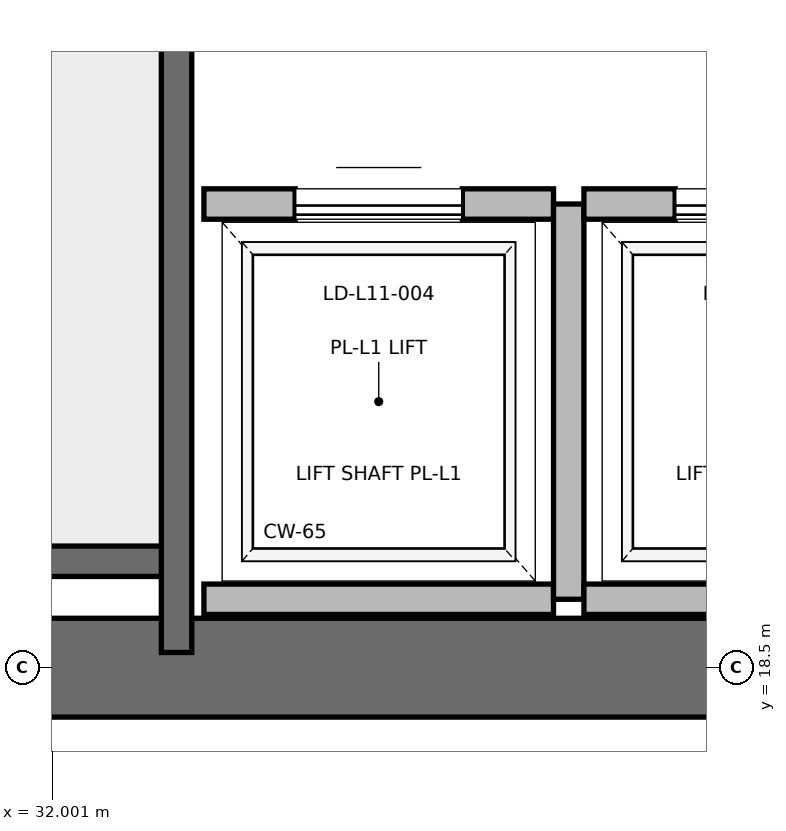
"""IFC4 building model, lengths in metres.
Left out: names, types, materials, properties, quantities, classifications, styles, units other than length and angle.
Written with IfcOpenShell. Run it as: python <this file> out.ifc"""

import sys

from ifc_helpers import new_model, si_unit, direction, frame, frame_2d, origin, place, context, subcontext, project, spatial, rectangle, extrude, element, fill, save


model = new_model("IFC4")
c1 = context("Model", 3, precision=1e-05, world=origin(), true_north=direction((0.0, 1.0)))
c2 = subcontext(c1, "Body", "Model", "MODEL_VIEW")
j1 = project(units=[si_unit("LENGTHUNIT", "METRE"), si_unit("PLANEANGLEUNIT", "RADIAN")], contexts=[c1])
p1 = place(None, origin())
s1 = spatial("IfcSite", under=j1, at=p1, CompositionType="ELEMENT")
p2 = place(p1, origin())
s2 = spatial("IfcBuilding", under=s1, at=p2, CompositionType="ELEMENT")
p3 = place(p2, frame((0.0, 0.0, 51.6)))
s3 = spatial("IfcBuildingStorey", under=s2, at=p3, CompositionType="ELEMENT", Elevation=51.6)
p4 = place(p3, frame((29.0, 18.5, 0.0), z_axis=(0.0, 0.0, 1.0), x_axis=(1.0, 0.0, 0.0)))
e1 = element("IfcWall", 1, at=p4, inside=s3, PredefinedType="SHEAR", context=c2, shape_type="SweptSolid", body=[
    extrude(rectangle(XDim=9.2, YDim=0.65, at=frame_2d((4.6, 0.0))), origin(), (0.0, 0.0, 1.0), 3.76),
])
p5 = place(p3, frame((29.7, 19.2, 0.0), z_axis=(0.0, 0.0, 1.0), x_axis=(1.0, 0.0, 0.0)))
e2 = element("IfcWall", 2, at=p5, inside=s3, PredefinedType="SOLIDWALL", context=c2, shape_type="SweptSolid", body=[
    extrude(rectangle(XDim=3.12, YDim=0.2, at=frame_2d((1.56, 0.0))), origin(), (0.0, 0.0, 1.0), 3.76),
])
p6 = place(p3, frame((32.82, 18.6, 0.0), z_axis=(0.0, 0.0, 1.0), x_axis=(0.0, 1.0, 0.0)))
e3 = element("IfcWall", 3, at=p6, inside=s3, PredefinedType="SOLIDWALL", context=c2, shape_type="SweptSolid", body=[
    extrude(rectangle(XDim=8.78, YDim=0.2, at=frame_2d((4.39, 0.0))), origin(), (0.0, 0.0, 1.0), 3.76),
])
p7 = place(p3, frame((33.0, 18.95, 0.0), z_axis=(0.0, 0.0, 1.0), x_axis=(1.0, 0.0, 0.0)))
e4 = element("IfcWall", 4, at=p7, inside=s3, PredefinedType="SOLIDWALL", context=c2, shape_type="SweptSolid", body=[
    extrude(rectangle(XDim=2.3, YDim=0.2, at=frame_2d((1.15, 0.0))), origin(), (0.0, 0.0, 1.0), 3.76),
])
p8 = place(p3, frame((35.3, 21.55, 0.0), z_axis=(0.0, 0.0, 1.0), x_axis=(-1.0, 0.0, 0.0)))
e5 = element("IfcWall", 5, at=p8, inside=s3, PredefinedType="SOLIDWALL", context=c2, shape_type="SweptSolid", body=[
    extrude(rectangle(XDim=2.3, YDim=0.2, at=frame_2d((1.15, 0.0))), origin(), (0.0, 0.0, 1.0), 3.76),
])
p9 = place(p8, frame((0.6, 0.0, 0.0)))
e6 = element("IfcOpeningElement", 6, at=p9, cuts=e5, PredefinedType="OPENING", context=c2, shape_type="SweptSolid", body=[
    extrude(rectangle(XDim=1.1, YDim=2.2, at=frame_2d((0.55, 1.1))), frame((0.0, 0.1, 0.0), z_axis=(0.0, -1.0, 0.0), x_axis=(1.0, 0.0, 0.0)), (0.0, 0.0, 1.0), 0.2),
])
p10 = place(p3, frame((35.4, 18.95, 0.0), z_axis=(0.0, 0.0, 1.0), x_axis=(0.0, 1.0, 0.0)))
e7 = element("IfcWall", 7, at=p10, inside=s3, PredefinedType="SOLIDWALL", context=c2, shape_type="SweptSolid", body=[
    extrude(rectangle(XDim=2.6, YDim=0.2, at=frame_2d((1.3, 0.0))), origin(), (0.0, 0.0, 1.0), 3.76),
])
p11 = place(p3, frame((35.5, 18.95, 0.0), z_axis=(0.0, 0.0, 1.0), x_axis=(1.0, 0.0, 0.0)))
e8 = element("IfcWall", 8, at=p11, inside=s3, PredefinedType="SOLIDWALL", context=c2, shape_type="SweptSolid", body=[
    extrude(rectangle(XDim=2.3, YDim=0.2, at=frame_2d((1.15, 0.0))), origin(), (0.0, 0.0, 1.0), 2.54),
])
p12 = place(p3, frame((37.8, 21.55, 0.0), z_axis=(0.0, 0.0, 1.0), x_axis=(-1.0, 0.0, 0.0)))
e9 = element("IfcWall", 9, at=p12, inside=s3, PredefinedType="SOLIDWALL", context=c2, shape_type="SweptSolid", body=[
    extrude(rectangle(XDim=2.3, YDim=0.2, at=frame_2d((1.15, 0.0))), origin(), (0.0, 0.0, 1.0), 3.76),
])
p13 = place(p12, frame((0.6, 0.0, 0.0)))
e10 = element("IfcOpeningElement", 10, at=p13, cuts=e9, PredefinedType="OPENING", context=c2, shape_type="SweptSolid", body=[
    extrude(rectangle(XDim=1.1, YDim=2.2, at=frame_2d((0.55, 1.1))), frame((0.0, 0.1, 0.0), z_axis=(0.0, -1.0, 0.0), x_axis=(1.0, 0.0, 0.0)), (0.0, 0.0, 1.0), 0.2),
])
p14 = place(p9, origin())
e11 = element("IfcDoor", 11, at=p14, inside=s3, OperationType="SLIDING_TO_RIGHT", PredefinedType="DOOR", context=c2, shape_type="SweptSolid", body=[
    extrude(rectangle(XDim=1.1, YDim=2.2, at=frame_2d((0.55, 1.1))), frame((0.0, 0.025, 0.0), z_axis=(0.0, -1.0, 0.0), x_axis=(1.0, 0.0, 0.0)), (0.0, 0.0, 1.0), 0.05),
])
fill(e6, e11)
p15 = place(p13, origin())
e12 = element("IfcDoor", 12, at=p15, inside=s3, OperationType="SLIDING_TO_RIGHT", PredefinedType="DOOR", context=c2, shape_type="SweptSolid", body=[
    extrude(rectangle(XDim=1.1, YDim=2.2, at=frame_2d((0.55, 1.1))), frame((0.0, 0.025, 0.0), z_axis=(0.0, -1.0, 0.0), x_axis=(1.0, 0.0, 0.0)), (0.0, 0.0, 1.0), 0.05),
])
fill(e10, e12)
save(model, sys.argv[1])
